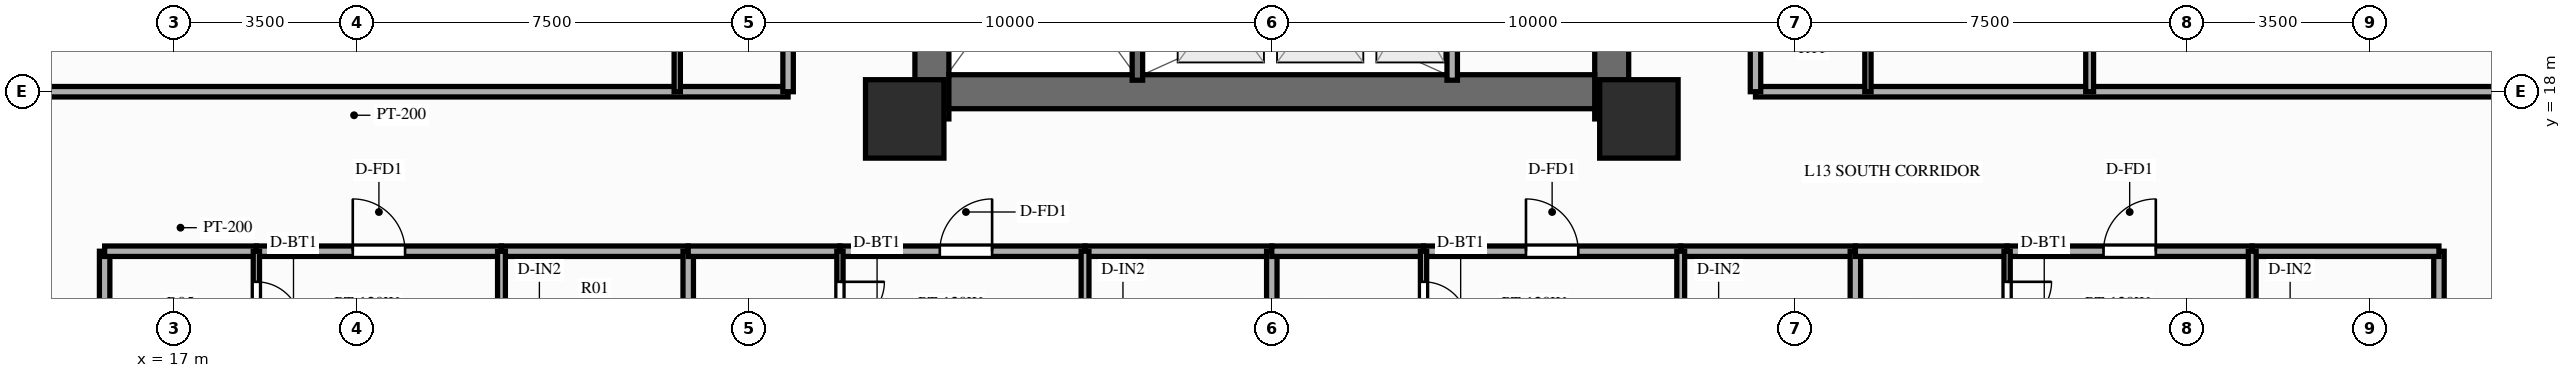
"""IFC4 building model, lengths in metres.
Left out: names, types, materials, properties, quantities, classifications, styles, units other than length and angle.
Written with IfcOpenShell. Run it as: python <this file> out.ifc"""

import sys

from ifc_helpers import new_model, si_unit, direction, frame, frame_2d, origin, origin_2d, place, context, subcontext, project, spatial, rectangle, extrude, source, transform, mapped, element, fill, save


model = new_model("IFC4")
c1 = context("Model", 3, precision=1e-05, world=origin(), true_north=direction((0.0, 1.0)))
c2 = subcontext(c1, "Body", "Model", "MODEL_VIEW")
j1 = project(units=[si_unit("LENGTHUNIT", "METRE"), si_unit("PLANEANGLEUNIT", "RADIAN")], contexts=[c1])
p1 = place(None, origin())
s1 = spatial("IfcSite", under=j1, at=p1, CompositionType="ELEMENT")
p2 = place(p1, origin())
s2 = spatial("IfcBuilding", under=s1, at=p2, CompositionType="ELEMENT")
p3 = place(p2, frame((0.0, 0.0, 43.4)))
s3 = spatial("IfcBuildingStorey", under=s2, at=p3, CompositionType="ELEMENT", Elevation=43.4)
p4 = place(p3, frame((31.5, 17.48, 0.0), z_axis=(0.0, 0.0, 1.0), x_axis=(0.0, 1.0, 0.0)))
e1 = element("IfcWall", 1, at=p4, inside=s3, PredefinedType="SHEAR", context=c2, shape_type="SweptSolid", body=[
    extrude(rectangle(XDim=19.04, YDim=0.65, at=frame_2d((9.52, 0.0))), origin(), (0.0, 0.0, 1.0), 3.0),
])
p5 = place(p4, frame((6.32, 0.0, 0.0)))
e2 = element("IfcOpeningElement", 2, at=p5, cuts=e1, PredefinedType="OPENING", context=c2, shape_type="SweptSolid", body=[
    extrude(rectangle(XDim=1.1, YDim=2.15, at=frame_2d((0.55, 1.075))), frame((0.0, 0.337, 0.0), z_axis=(0.0, -1.0, 0.0), x_axis=(1.0, 0.0, 0.0)), (0.0, 0.0, 1.0), 0.674),
])
p6 = place(p3, frame((44.5, 17.48, 0.0), z_axis=(0.0, 0.0, 1.0), x_axis=(0.0, 1.0, 0.0)))
e3 = element("IfcWall", 3, at=p6, inside=s3, PredefinedType="SHEAR", context=c2, shape_type="SweptSolid", body=[
    extrude(rectangle(XDim=19.04, YDim=0.65, at=frame_2d((9.52, 0.0))), origin(), (0.0, 0.0, 1.0), 3.0),
])
p7 = place(p6, frame((12.67, 0.0, 0.0), z_axis=(0.0, 0.0, 1.0), x_axis=(-1.0, 0.0, 0.0)))
e4 = element("IfcOpeningElement", 4, at=p7, cuts=e3, PredefinedType="OPENING", context=c2, shape_type="SweptSolid", body=[
    extrude(rectangle(XDim=1.1, YDim=2.15, at=frame_2d((0.55, 1.075))), frame((0.0, 0.337, 0.0), z_axis=(0.0, -1.0, 0.0), x_axis=(1.0, 0.0, 0.0)), (0.0, 0.0, 1.0), 0.674),
])
p8 = place(p3, frame((31.825, 18.0, 0.0), z_axis=(0.0, 0.0, 1.0), x_axis=(1.0, 0.0, 0.0)))
e5 = element("IfcWall", 5, at=p8, inside=s3, PredefinedType="SHEAR", context=c2, shape_type="SweptSolid", body=[
    extrude(rectangle(XDim=12.35, YDim=0.65, at=frame_2d((6.175, 0.0))), origin(), (0.0, 0.0, 1.0), 3.0),
])
m1 = source(origin(), c2, "Body", "SweptSolid", [
    extrude(rectangle(XDim=1.5, YDim=1.5, at=origin_2d()), origin(), (0.0, 0.0, 1.0), 3.0),
])
for number, where, z_axis, x_axis in (
    (6, (30.98, 17.48, 0.0), (0.0, 0.0, 1.0), (1.0, 0.0, 0.0)),
    (7, (45.02, 17.48, 0.0), (0.0, 0.0, 1.0), (1.0, 0.0, 0.0)),
):
    element("IfcColumn", number, at=place(p3, frame(where, z_axis=z_axis, x_axis=x_axis)), inside=s3, PredefinedType="COLUMN", context=c2, shape_type="MappedRepresentation", body=[
        mapped(m1, transform((0.0, 0.0, 0.0), scale=1.0)),
    ])
p9 = place(p3, frame((41.45, 18.22, 0.0), z_axis=(0.0, 0.0, 1.0), x_axis=(0.0, 1.0, 0.0)))
e8 = element("IfcWall", 8, at=p9, inside=s3, PredefinedType="PARTITIONING", context=c2, shape_type="SweptSolid", body=[
    extrude(rectangle(XDim=2.86, YDim=0.2, at=frame_2d((1.43, 0.0))), origin(), (0.0, 0.0, 1.0), 2.79),
])
p10 = place(p3, frame((35.43, 18.22, 0.0), z_axis=(0.0, 0.0, 1.0), x_axis=(0.0, 1.0, 0.0)))
e9 = element("IfcWall", 9, at=p10, inside=s3, PredefinedType="SOLIDWALL", context=c2, shape_type="SweptSolid", body=[
    extrude(rectangle(XDim=7.22, YDim=0.2, at=frame_2d((3.61, 0.0))), origin(), (0.0, 0.0, 1.0), 2.79),
])
p11 = place(p10, frame((6.68, 0.0, 0.0), z_axis=(0.0, 0.0, 1.0), x_axis=(-1.0, 0.0, 0.0)))
e10 = element("IfcOpeningElement", 10, at=p11, cuts=e9, PredefinedType="OPENING", context=c2, shape_type="SweptSolid", body=[
    extrude(rectangle(XDim=1.1, YDim=2.15, at=frame_2d((0.55, 1.075))), frame((0.0, 0.112, 0.0), z_axis=(0.0, -1.0, 0.0), x_axis=(1.0, 0.0, 0.0)), (0.0, 0.0, 1.0), 0.224),
])
for number, where, z_axis, x_axis in (
    (11, (15.68, 14.95, 0.0), (0.0, 0.0, 1.0), (0.0, -1.0, 0.0)),
    (12, (60.32, 14.95, 0.0), (0.0, 0.0, 1.0), (0.0, -1.0, 0.0)),
):
    element("IfcWall", number, at=place(p3, frame(where, z_axis=z_axis, x_axis=x_axis)), inside=s3, PredefinedType="PARTITIONING", context=c2, shape_type="SweptSolid", body=[
        extrude(rectangle(XDim=11.8, YDim=0.2, at=frame_2d((5.9, 0.0))), origin(), (0.0, 0.0, 1.0), 2.79),
    ])
p12 = place(p3, frame((15.68, 14.95, 0.0), z_axis=(0.0, 0.0, 1.0), x_axis=(1.0, 0.0, 0.0)))
e13 = element("IfcWall", 13, at=p12, inside=s3, PredefinedType="PARTITIONING", context=c2, shape_type="SweptSolid", body=[
    extrude(rectangle(XDim=2.902, YDim=0.2, at=frame_2d((1.451, 0.0))), origin(), (0.0, 0.0, 1.0), 2.79),
])
p13 = place(p3, frame((18.582, 14.95, 0.0), z_axis=(0.0, 0.0, 1.0), x_axis=(1.0, 0.0, 0.0)))
e14 = element("IfcWall", 14, at=p13, inside=s3, PredefinedType="PARTITIONING", context=c2, shape_type="SweptSolid", body=[
    extrude(rectangle(XDim=4.687, YDim=0.2, at=frame_2d((2.344, 0.0))), origin(), (0.0, 0.0, 1.0), 2.79),
])
p14 = place(p13, frame((1.844, 0.0, 0.0)))
e15 = element("IfcOpeningElement", 15, at=p14, cuts=e14, PredefinedType="OPENING", context=c2, shape_type="SweptSolid", body=[
    extrude(rectangle(XDim=1.0, YDim=2.15, at=frame_2d((0.5, 1.075))), frame((0.0, 0.112, 0.0), z_axis=(0.0, -1.0, 0.0), x_axis=(1.0, 0.0, 0.0)), (0.0, 0.0, 1.0), 0.224),
])
p15 = place(p3, frame((23.269, 14.95, 0.0), z_axis=(0.0, 0.0, 1.0), x_axis=(1.0, 0.0, 0.0)))
e16 = element("IfcWall", 16, at=p15, inside=s3, PredefinedType="PARTITIONING", context=c2, shape_type="SweptSolid", body=[
    extrude(rectangle(XDim=3.571, YDim=0.2, at=frame_2d((1.786, 0.0))), origin(), (0.0, 0.0, 1.0), 2.79),
])
p16 = place(p3, frame((18.582, 14.95, 0.0), z_axis=(0.0, 0.0, 1.0), x_axis=(0.0, -1.0, 0.0)))
e17 = element("IfcWall", 17, at=p16, inside=s3, PredefinedType="PARTITIONING", context=c2, shape_type="SweptSolid", body=[
    extrude(rectangle(XDim=2.02, YDim=0.12, at=frame_2d((1.01, 0.0))), origin(), (0.0, 0.0, 1.0), 2.79),
])
p17 = place(p16, frame((0.585, 0.0, 0.0)))
e18 = element("IfcOpeningElement", 18, at=p17, cuts=e17, PredefinedType="OPENING", context=c2, shape_type="SweptSolid", body=[
    extrude(rectangle(XDim=0.85, YDim=2.05, at=frame_2d((0.425, 1.025))), frame((0.0, 0.072, 0.0), z_axis=(0.0, -1.0, 0.0), x_axis=(1.0, 0.0, 0.0)), (0.0, 0.0, 1.0), 0.144),
])
p18 = place(p3, frame((23.269, 14.95, 0.0), z_axis=(0.0, 0.0, 1.0), x_axis=(0.0, -1.0, 0.0)))
e19 = element("IfcWall", 19, at=p18, inside=s3, PredefinedType="PARTITIONING", context=c2, shape_type="SweptSolid", body=[
    extrude(rectangle(XDim=3.07, YDim=0.15, at=frame_2d((1.535, 0.0))), origin(), (0.0, 0.0, 1.0), 2.79),
])
p19 = place(p18, frame((1.085, 0.0, 0.0)))
e20 = element("IfcOpeningElement", 20, at=p19, cuts=e19, PredefinedType="OPENING", context=c2, shape_type="SweptSolid", body=[
    extrude(rectangle(XDim=0.9, YDim=2.1, at=frame_2d((0.45, 1.05))), frame((0.0, 0.087, 0.0), z_axis=(0.0, -1.0, 0.0), x_axis=(1.0, 0.0, 0.0)), (0.0, 0.0, 1.0), 0.174),
])
p20 = place(p3, frame((26.84, 14.95, 0.0), z_axis=(0.0, 0.0, 1.0), x_axis=(0.0, -1.0, 0.0)))
e21 = element("IfcWall", 21, at=p20, inside=s3, PredefinedType="PARTITIONING", context=c2, shape_type="SweptSolid", body=[
    extrude(rectangle(XDim=11.8, YDim=0.2, at=frame_2d((5.9, 0.0))), origin(), (0.0, 0.0, 1.0), 2.79),
])
p21 = place(p3, frame((26.84, 14.95, 0.0), z_axis=(0.0, 0.0, 1.0), x_axis=(1.0, 0.0, 0.0)))
e22 = element("IfcWall", 22, at=p21, inside=s3, PredefinedType="PARTITIONING", context=c2, shape_type="SweptSolid", body=[
    extrude(rectangle(XDim=2.902, YDim=0.2, at=frame_2d((1.451, 0.0))), origin(), (0.0, 0.0, 1.0), 2.79),
])
p22 = place(p3, frame((29.742, 14.95, 0.0), z_axis=(0.0, 0.0, 1.0), x_axis=(1.0, 0.0, 0.0)))
e23 = element("IfcWall", 23, at=p22, inside=s3, PredefinedType="PARTITIONING", context=c2, shape_type="SweptSolid", body=[
    extrude(rectangle(XDim=4.687, YDim=0.2, at=frame_2d((2.344, 0.0))), origin(), (0.0, 0.0, 1.0), 2.79),
])
p23 = place(p22, frame((1.91, 0.0, 0.0)))
e24 = element("IfcOpeningElement", 24, at=p23, cuts=e23, PredefinedType="OPENING", context=c2, shape_type="SweptSolid", body=[
    extrude(rectangle(XDim=1.0, YDim=2.15, at=frame_2d((0.5, 1.075))), frame((0.0, 0.112, 0.0), z_axis=(0.0, -1.0, 0.0), x_axis=(1.0, 0.0, 0.0)), (0.0, 0.0, 1.0), 0.224),
])
p24 = place(p3, frame((34.429, 14.95, 0.0), z_axis=(0.0, 0.0, 1.0), x_axis=(1.0, 0.0, 0.0)))
e25 = element("IfcWall", 25, at=p24, inside=s3, PredefinedType="PARTITIONING", context=c2, shape_type="SweptSolid", body=[
    extrude(rectangle(XDim=3.571, YDim=0.2, at=frame_2d((1.786, 0.0))), origin(), (0.0, 0.0, 1.0), 2.79),
])
p25 = place(p3, frame((29.742, 14.95, 0.0), z_axis=(0.0, 0.0, 1.0), x_axis=(0.0, -1.0, 0.0)))
e26 = element("IfcWall", 26, at=p25, inside=s3, PredefinedType="PARTITIONING", context=c2, shape_type="SweptSolid", body=[
    extrude(rectangle(XDim=2.02, YDim=0.12, at=frame_2d((1.01, 0.0))), origin(), (0.0, 0.0, 1.0), 2.79),
])
p26 = place(p25, frame((0.585, 0.0, 0.0)))
e27 = element("IfcOpeningElement", 27, at=p26, cuts=e26, PredefinedType="OPENING", context=c2, shape_type="SweptSolid", body=[
    extrude(rectangle(XDim=0.85, YDim=2.05, at=frame_2d((0.425, 1.025))), frame((0.0, 0.072, 0.0), z_axis=(0.0, -1.0, 0.0), x_axis=(1.0, 0.0, 0.0)), (0.0, 0.0, 1.0), 0.144),
])
p27 = place(p3, frame((34.429, 14.95, 0.0), z_axis=(0.0, 0.0, 1.0), x_axis=(0.0, -1.0, 0.0)))
e28 = element("IfcWall", 28, at=p27, inside=s3, PredefinedType="PARTITIONING", context=c2, shape_type="SweptSolid", body=[
    extrude(rectangle(XDim=3.07, YDim=0.15, at=frame_2d((1.535, 0.0))), origin(), (0.0, 0.0, 1.0), 2.79),
])
p28 = place(p27, frame((1.085, 0.0, 0.0)))
e29 = element("IfcOpeningElement", 29, at=p28, cuts=e28, PredefinedType="OPENING", context=c2, shape_type="SweptSolid", body=[
    extrude(rectangle(XDim=0.9, YDim=2.1, at=frame_2d((0.45, 1.05))), frame((0.0, 0.087, 0.0), z_axis=(0.0, -1.0, 0.0), x_axis=(1.0, 0.0, 0.0)), (0.0, 0.0, 1.0), 0.174),
])
p29 = place(p3, frame((38.0, 14.95, 0.0), z_axis=(0.0, 0.0, 1.0), x_axis=(0.0, -1.0, 0.0)))
e30 = element("IfcWall", 30, at=p29, inside=s3, PredefinedType="PARTITIONING", context=c2, shape_type="SweptSolid", body=[
    extrude(rectangle(XDim=11.8, YDim=0.2, at=frame_2d((5.9, 0.0))), origin(), (0.0, 0.0, 1.0), 2.79),
])
p30 = place(p3, frame((38.0, 14.95, 0.0), z_axis=(0.0, 0.0, 1.0), x_axis=(1.0, 0.0, 0.0)))
e31 = element("IfcWall", 31, at=p30, inside=s3, PredefinedType="PARTITIONING", context=c2, shape_type="SweptSolid", body=[
    extrude(rectangle(XDim=2.902, YDim=0.2, at=frame_2d((1.451, 0.0))), origin(), (0.0, 0.0, 1.0), 2.79),
])
p31 = place(p3, frame((40.902, 14.95, 0.0), z_axis=(0.0, 0.0, 1.0), x_axis=(1.0, 0.0, 0.0)))
e32 = element("IfcWall", 32, at=p31, inside=s3, PredefinedType="PARTITIONING", context=c2, shape_type="SweptSolid", body=[
    extrude(rectangle(XDim=4.918, YDim=0.2, at=frame_2d((2.459, 0.0))), origin(), (0.0, 0.0, 1.0), 2.79),
])
p32 = place(p31, frame((1.959, 0.0, 0.0)))
e33 = element("IfcOpeningElement", 33, at=p32, cuts=e32, PredefinedType="OPENING", context=c2, shape_type="SweptSolid", body=[
    extrude(rectangle(XDim=1.0, YDim=2.15, at=frame_2d((0.5, 1.075))), frame((0.0, 0.112, 0.0), z_axis=(0.0, -1.0, 0.0), x_axis=(1.0, 0.0, 0.0)), (0.0, 0.0, 1.0), 0.224),
])
p33 = place(p3, frame((45.82, 14.95, 0.0), z_axis=(0.0, 0.0, 1.0), x_axis=(1.0, 0.0, 0.0)))
e34 = element("IfcWall", 34, at=p33, inside=s3, PredefinedType="PARTITIONING", context=c2, shape_type="SweptSolid", body=[
    extrude(rectangle(XDim=3.34, YDim=0.2, at=frame_2d((1.67, 0.0))), origin(), (0.0, 0.0, 1.0), 2.79),
])
p34 = place(p3, frame((40.902, 14.95, 0.0), z_axis=(0.0, 0.0, 1.0), x_axis=(0.0, -1.0, 0.0)))
e35 = element("IfcWall", 35, at=p34, inside=s3, PredefinedType="PARTITIONING", context=c2, shape_type="SweptSolid", body=[
    extrude(rectangle(XDim=2.02, YDim=0.12, at=frame_2d((1.01, 0.0))), origin(), (0.0, 0.0, 1.0), 2.79),
])
p35 = place(p34, frame((0.585, 0.0, 0.0)))
e36 = element("IfcOpeningElement", 36, at=p35, cuts=e35, PredefinedType="OPENING", context=c2, shape_type="SweptSolid", body=[
    extrude(rectangle(XDim=0.85, YDim=2.05, at=frame_2d((0.425, 1.025))), frame((0.0, 0.072, 0.0), z_axis=(0.0, -1.0, 0.0), x_axis=(1.0, 0.0, 0.0)), (0.0, 0.0, 1.0), 0.144),
])
p36 = place(p3, frame((45.82, 14.95, 0.0), z_axis=(0.0, 0.0, 1.0), x_axis=(0.0, -1.0, 0.0)))
e37 = element("IfcWall", 37, at=p36, inside=s3, PredefinedType="PARTITIONING", context=c2, shape_type="SweptSolid", body=[
    extrude(rectangle(XDim=3.07, YDim=0.15, at=frame_2d((1.535, 0.0))), origin(), (0.0, 0.0, 1.0), 2.79),
])
p37 = place(p36, frame((1.085, 0.0, 0.0)))
e38 = element("IfcOpeningElement", 38, at=p37, cuts=e37, PredefinedType="OPENING", context=c2, shape_type="SweptSolid", body=[
    extrude(rectangle(XDim=0.9, YDim=2.1, at=frame_2d((0.45, 1.05))), frame((0.0, 0.087, 0.0), z_axis=(0.0, -1.0, 0.0), x_axis=(1.0, 0.0, 0.0)), (0.0, 0.0, 1.0), 0.174),
])
p38 = place(p3, frame((49.16, 14.95, 0.0), z_axis=(0.0, 0.0, 1.0), x_axis=(0.0, -1.0, 0.0)))
e39 = element("IfcWall", 39, at=p38, inside=s3, PredefinedType="PARTITIONING", context=c2, shape_type="SweptSolid", body=[
    extrude(rectangle(XDim=11.8, YDim=0.2, at=frame_2d((5.9, 0.0))), origin(), (0.0, 0.0, 1.0), 2.79),
])
p39 = place(p3, frame((49.16, 14.95, 0.0), z_axis=(0.0, 0.0, 1.0), x_axis=(1.0, 0.0, 0.0)))
e40 = element("IfcWall", 40, at=p39, inside=s3, PredefinedType="PARTITIONING", context=c2, shape_type="SweptSolid", body=[
    extrude(rectangle(XDim=2.902, YDim=0.2, at=frame_2d((1.451, 0.0))), origin(), (0.0, 0.0, 1.0), 2.79),
])
p40 = place(p3, frame((52.062, 14.95, 0.0), z_axis=(0.0, 0.0, 1.0), x_axis=(1.0, 0.0, 0.0)))
e41 = element("IfcWall", 41, at=p40, inside=s3, PredefinedType="PARTITIONING", context=c2, shape_type="SweptSolid", body=[
    extrude(rectangle(XDim=4.687, YDim=0.2, at=frame_2d((2.344, 0.0))), origin(), (0.0, 0.0, 1.0), 2.79),
])
p41 = place(p40, frame((1.844, 0.0, 0.0)))
e42 = element("IfcOpeningElement", 42, at=p41, cuts=e41, PredefinedType="OPENING", context=c2, shape_type="SweptSolid", body=[
    extrude(rectangle(XDim=1.0, YDim=2.15, at=frame_2d((0.5, 1.075))), frame((0.0, 0.112, 0.0), z_axis=(0.0, -1.0, 0.0), x_axis=(1.0, 0.0, 0.0)), (0.0, 0.0, 1.0), 0.224),
])
p42 = place(p3, frame((56.749, 14.95, 0.0), z_axis=(0.0, 0.0, 1.0), x_axis=(1.0, 0.0, 0.0)))
e43 = element("IfcWall", 43, at=p42, inside=s3, PredefinedType="PARTITIONING", context=c2, shape_type="SweptSolid", body=[
    extrude(rectangle(XDim=3.571, YDim=0.2, at=frame_2d((1.786, 0.0))), origin(), (0.0, 0.0, 1.0), 2.79),
])
p43 = place(p3, frame((52.062, 14.95, 0.0), z_axis=(0.0, 0.0, 1.0), x_axis=(0.0, -1.0, 0.0)))
e44 = element("IfcWall", 44, at=p43, inside=s3, PredefinedType="PARTITIONING", context=c2, shape_type="SweptSolid", body=[
    extrude(rectangle(XDim=2.02, YDim=0.12, at=frame_2d((1.01, 0.0))), origin(), (0.0, 0.0, 1.0), 2.79),
])
p44 = place(p43, frame((0.585, 0.0, 0.0)))
e45 = element("IfcOpeningElement", 45, at=p44, cuts=e44, PredefinedType="OPENING", context=c2, shape_type="SweptSolid", body=[
    extrude(rectangle(XDim=0.85, YDim=2.05, at=frame_2d((0.425, 1.025))), frame((0.0, 0.072, 0.0), z_axis=(0.0, -1.0, 0.0), x_axis=(1.0, 0.0, 0.0)), (0.0, 0.0, 1.0), 0.144),
])
p45 = place(p3, frame((56.749, 14.95, 0.0), z_axis=(0.0, 0.0, 1.0), x_axis=(0.0, -1.0, 0.0)))
e46 = element("IfcWall", 46, at=p45, inside=s3, PredefinedType="PARTITIONING", context=c2, shape_type="SweptSolid", body=[
    extrude(rectangle(XDim=3.07, YDim=0.15, at=frame_2d((1.535, 0.0))), origin(), (0.0, 0.0, 1.0), 2.79),
])
p46 = place(p45, frame((1.085, 0.0, 0.0)))
e47 = element("IfcOpeningElement", 47, at=p46, cuts=e46, PredefinedType="OPENING", context=c2, shape_type="SweptSolid", body=[
    extrude(rectangle(XDim=0.9, YDim=2.1, at=frame_2d((0.45, 1.05))), frame((0.0, 0.087, 0.0), z_axis=(0.0, -1.0, 0.0), x_axis=(1.0, 0.0, 0.0)), (0.0, 0.0, 1.0), 0.174),
])
p47 = place(p3, frame((28.75, 18.0, 0.0), z_axis=(0.0, 0.0, 1.0), x_axis=(-1.0, 0.0, 0.0)))
e48 = element("IfcWall", 48, at=p47, inside=s3, PredefinedType="PARTITIONING", context=c2, shape_type="SweptSolid", body=[
    extrude(rectangle(XDim=16.6, YDim=0.2, at=frame_2d((8.3, 0.0))), origin(), (0.0, 0.0, 1.0), 2.24),
])
p48 = place(p3, frame((28.75, 18.0, 0.0), z_axis=(0.0, 0.0, 1.0), x_axis=(0.0, 1.0, 0.0)))
e49 = element("IfcWall", 49, at=p48, inside=s3, PredefinedType="PARTITIONING", context=c2, shape_type="SweptSolid", body=[
    extrude(rectangle(XDim=2.513, YDim=0.2, at=frame_2d((1.256, 0.0))), origin(), (0.0, 0.0, 1.0), 2.79),
])
p49 = place(p3, frame((26.63, 18.0, 0.0), z_axis=(0.0, 0.0, 1.0), x_axis=(0.0, 1.0, 0.0)))
e50 = element("IfcWall", 50, at=p49, inside=s3, PredefinedType="PARTITIONING", context=c2, shape_type="SweptSolid", body=[
    extrude(rectangle(XDim=2.513, YDim=0.12, at=frame_2d((1.256, 0.0))), origin(), (0.0, 0.0, 1.0), 2.79),
])
p50 = place(p3, frame((47.25, 18.0, 0.0), z_axis=(0.0, 0.0, 1.0), x_axis=(1.0, 0.0, 0.0)))
e51 = element("IfcWall", 51, at=p50, inside=s3, PredefinedType="PARTITIONING", context=c2, shape_type="SweptSolid", body=[
    extrude(rectangle(XDim=16.6, YDim=0.2, at=frame_2d((8.3, 0.0))), origin(), (0.0, 0.0, 1.0), 2.24),
])
p51 = place(p3, frame((47.25, 18.0, 0.0), z_axis=(0.0, 0.0, 1.0), x_axis=(0.0, 1.0, 0.0)))
e52 = element("IfcWall", 52, at=p51, inside=s3, PredefinedType="PARTITIONING", context=c2, shape_type="SweptSolid", body=[
    extrude(rectangle(XDim=2.807, YDim=0.2, at=frame_2d((1.404, 0.0))), origin(), (0.0, 0.0, 1.0), 2.79),
])
p52 = place(p3, frame((49.4, 18.0, 0.0), z_axis=(0.0, 0.0, 1.0), x_axis=(0.0, 1.0, 0.0)))
e53 = element("IfcWall", 53, at=p52, inside=s3, PredefinedType="PARTITIONING", context=c2, shape_type="SweptSolid", body=[
    extrude(rectangle(XDim=2.807, YDim=0.12, at=frame_2d((1.404, 0.0))), origin(), (0.0, 0.0, 1.0), 2.79),
])
p53 = place(p3, frame((53.64, 18.0, 0.0), z_axis=(0.0, 0.0, 1.0), x_axis=(0.0, 1.0, 0.0)))
e54 = element("IfcWall", 54, at=p53, inside=s3, PredefinedType="PARTITIONING", context=c2, shape_type="SweptSolid", body=[
    extrude(rectangle(XDim=2.807, YDim=0.15, at=frame_2d((1.404, 0.0))), origin(), (0.0, 0.0, 1.0), 2.79),
])
m2 = source(origin(), c2, "Body", "SweptSolid", [
    extrude(rectangle(XDim=1.0, YDim=2.15, at=frame_2d((0.5, 1.075))), frame((0.0, 0.025, 0.0), z_axis=(0.0, -1.0, 0.0), x_axis=(1.0, 0.0, 0.0)), (0.0, 0.0, 1.0), 0.05),
])
p54 = place(p14, origin())
e55 = element("IfcDoor", 55, at=p54, inside=s3, OperationType="SINGLE_SWING_LEFT", PredefinedType="DOOR", context=c2, shape_type="MappedRepresentation", body=[
    mapped(m2, transform((0.0, 0.0, 0.0), scale=1.0)),
])
fill(e15, e55)
m3 = source(origin(), c2, "Body", "SweptSolid", [
    extrude(rectangle(XDim=0.85, YDim=2.05, at=frame_2d((0.425, 1.025))), frame((0.0, 0.025, 0.0), z_axis=(0.0, -1.0, 0.0), x_axis=(1.0, 0.0, 0.0)), (0.0, 0.0, 1.0), 0.05),
])
p55 = place(p17, origin())
e56 = element("IfcDoor", 56, at=p55, inside=s3, OperationType="SINGLE_SWING_RIGHT", PredefinedType="DOOR", context=c2, shape_type="MappedRepresentation", body=[
    mapped(m3, transform((0.0, 0.0, 0.0), scale=1.0)),
])
fill(e18, e56)
p56 = place(p23, origin())
e57 = element("IfcDoor", 57, at=p56, inside=s3, OperationType="SINGLE_SWING_RIGHT", PredefinedType="DOOR", context=c2, shape_type="MappedRepresentation", body=[
    mapped(m2, transform((0.0, 0.0, 0.0), scale=1.0)),
])
fill(e24, e57)
p57 = place(p26, origin())
e58 = element("IfcDoor", 58, at=p57, inside=s3, OperationType="SINGLE_SWING_LEFT", PredefinedType="DOOR", context=c2, shape_type="MappedRepresentation", body=[
    mapped(m3, transform((0.0, 0.0, 0.0), scale=1.0)),
])
fill(e27, e58)
p58 = place(p32, origin())
e59 = element("IfcDoor", 59, at=p58, inside=s3, OperationType="SINGLE_SWING_LEFT", PredefinedType="DOOR", context=c2, shape_type="MappedRepresentation", body=[
    mapped(m2, transform((0.0, 0.0, 0.0), scale=1.0)),
])
fill(e33, e59)
p59 = place(p35, origin())
e60 = element("IfcDoor", 60, at=p59, inside=s3, OperationType="SINGLE_SWING_RIGHT", PredefinedType="DOOR", context=c2, shape_type="MappedRepresentation", body=[
    mapped(m3, transform((0.0, 0.0, 0.0), scale=1.0)),
])
fill(e36, e60)
p60 = place(p41, origin())
e61 = element("IfcDoor", 61, at=p60, inside=s3, OperationType="SINGLE_SWING_RIGHT", PredefinedType="DOOR", context=c2, shape_type="MappedRepresentation", body=[
    mapped(m2, transform((0.0, 0.0, 0.0), scale=1.0)),
])
fill(e42, e61)
p61 = place(p44, origin())
e62 = element("IfcDoor", 62, at=p61, inside=s3, OperationType="SINGLE_SWING_LEFT", PredefinedType="DOOR", context=c2, shape_type="MappedRepresentation", body=[
    mapped(m3, transform((0.0, 0.0, 0.0), scale=1.0)),
])
fill(e45, e62)
save(model, sys.argv[1])
